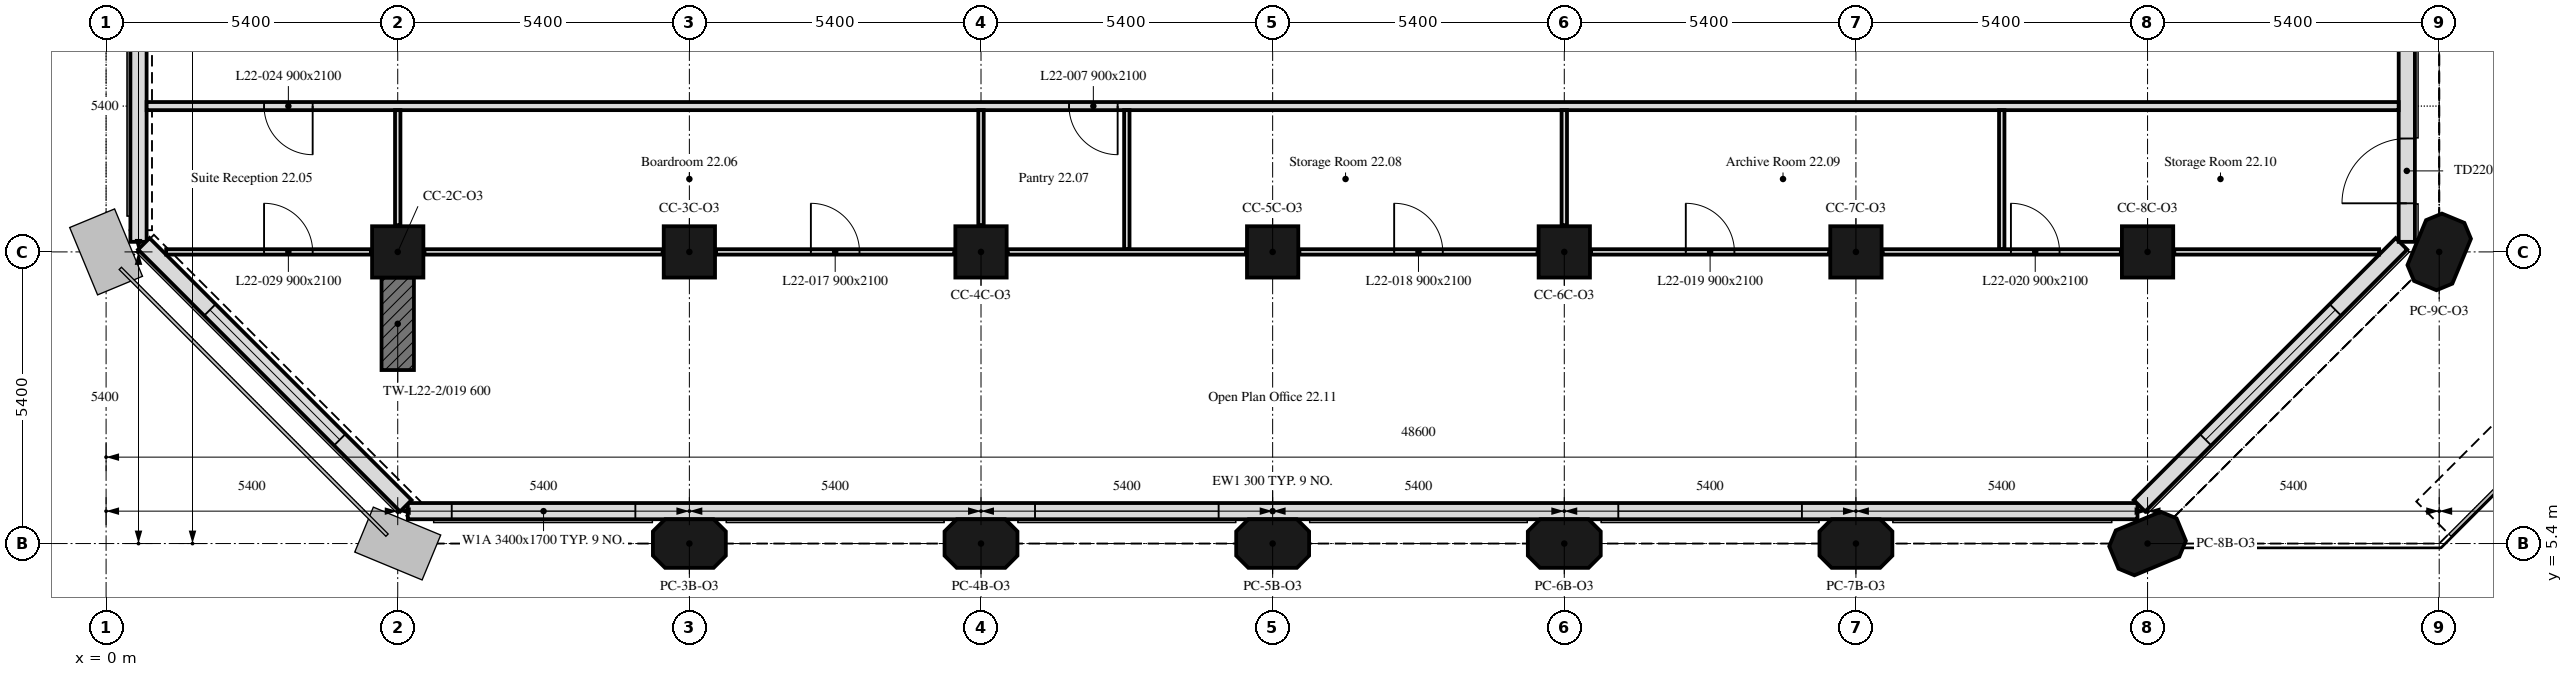
"""IFC4 building model, lengths in metres.
Left out: names, types, materials, properties, quantities, classifications, styles, units other than length and angle.
Written with IfcOpenShell. Run it as: python <this file> out.ifc"""

import sys

from ifc_helpers import new_model, si_unit, direction, frame, frame_2d, origin, origin_2d, place, context, subcontext, project, spatial, polyline, rectangle, outline, extrude, element, fill, save


model = new_model("IFC4")
c1 = context("Model", 3, precision=1e-05, world=origin(), true_north=direction((0.0, 1.0)))
c2 = subcontext(c1, "Body", "Model", "MODEL_VIEW")
j1 = project(units=[si_unit("LENGTHUNIT", "METRE"), si_unit("PLANEANGLEUNIT", "RADIAN")], contexts=[c1])
p1 = place(None, origin())
s1 = spatial("IfcSite", under=j1, at=p1, CompositionType="ELEMENT")
p2 = place(p1, origin())
s2 = spatial("IfcBuilding", under=s1, at=p2, CompositionType="ELEMENT")
p3 = place(p2, frame((0.0, 0.0, 95.4)))
s3 = spatial("IfcBuildingStorey", under=s2, at=p3, CompositionType="ELEMENT", Elevation=95.4)
for number, where, z_axis, x_axis in (
    (1, (10.8, 5.4, 0.0), (0.0, 0.0, 1.0), (1.0, 0.0, 0.0)),
    (2, (16.2, 5.4, 0.0), (0.0, 0.0, 1.0), (1.0, 0.0, 0.0)),
    (3, (21.6, 5.4, 0.0), (0.0, 0.0, 1.0), (1.0, 0.0, 0.0)),
    (4, (27.0, 5.4, 0.0), (0.0, 0.0, 1.0), (1.0, 0.0, 0.0)),
    (5, (32.4, 5.4, 0.0), (0.0, 0.0, 1.0), (1.0, 0.0, 0.0)),
    (6, (37.8, 5.4, 0.0), (0.0, 0.0, 1.0), (0.924, 0.383, 0.0)),
):
    element("IfcColumn", number, at=place(p3, frame(where, z_axis=z_axis, x_axis=x_axis)), inside=s3, PredefinedType="COLUMN", context=c2, shape_type="SweptSolid", body=[
        extrude(outline(polyline([(-0.45, -0.45), (0.45, -0.45), (0.675, -0.225), (0.675, 0.225), (0.45, 0.45), (-0.45, 0.45), (-0.675, 0.225), (-0.675, -0.225), (-0.45, -0.45)])), origin(), (0.0, 0.0, 1.0), 3.5),
    ])
for number, where, z_axis, x_axis in (
    (7, (5.4, 10.8, 0.0), (0.0, 0.0, 1.0), (1.0, 0.0, 0.0)),
    (8, (10.8, 10.8, 0.0), (0.0, 0.0, 1.0), (1.0, 0.0, 0.0)),
    (9, (16.2, 10.8, 0.0), (0.0, 0.0, 1.0), (1.0, 0.0, 0.0)),
    (10, (21.6, 10.8, 0.0), (0.0, 0.0, 1.0), (1.0, 0.0, 0.0)),
    (11, (27.0, 10.8, 0.0), (0.0, 0.0, 1.0), (1.0, 0.0, 0.0)),
    (12, (32.4, 10.8, 0.0), (0.0, 0.0, 1.0), (1.0, 0.0, 0.0)),
    (13, (37.8, 10.8, 0.0), (0.0, 0.0, 1.0), (1.0, 0.0, 0.0)),
):
    element("IfcColumn", number, at=place(p3, frame(where, z_axis=z_axis, x_axis=x_axis)), inside=s3, PredefinedType="COLUMN", context=c2, shape_type="SweptSolid", body=[
        extrude(rectangle(XDim=0.95, YDim=0.95, at=origin_2d()), origin(), (0.0, 0.0, 1.0), 3.5),
    ])
p4 = place(p3, frame((43.2, 10.8, 0.0), z_axis=(0.0, 0.0, 1.0), x_axis=(0.382683432365, 0.923879532511, 0.0)))
e14 = element("IfcColumn", 14, at=p4, inside=s3, PredefinedType="COLUMN", context=c2, shape_type="SweptSolid", body=[
    extrude(outline(polyline([(-0.45, -0.45), (0.45, -0.45), (0.675, -0.225), (0.675, 0.225), (0.45, 0.45), (-0.45, 0.45), (-0.675, 0.225), (-0.675, -0.225), (-0.45, -0.45)])), origin(), (0.0, 0.0, 1.0), 3.5),
])
p5 = place(p3, frame((5.4, 8.613, 0.0), z_axis=(0.0, 0.0, 1.0), x_axis=(0.0, 1.0, 0.0)))
e15 = element("IfcWall", 15, at=p5, inside=s3, PredefinedType="SHEAR", context=c2, shape_type="SweptSolid", body=[
    extrude(rectangle(XDim=1.712, YDim=0.6, at=frame_2d((0.856, 0.0))), origin(), (0.0, 0.0, 1.0), 3.5),
])
p6 = place(p3, frame((5.586, 6.0, 0.0), z_axis=(0.0, 0.0, 1.0), x_axis=(1.0, 0.0, 0.0)))
e16 = element("IfcWall", 16, at=p6, inside=s3, PredefinedType="SOLIDWALL", context=c2, shape_type="SweptSolid", body=[
    extrude(rectangle(XDim=32.027, YDim=0.3, at=frame_2d((16.014, 0.0))), origin(), (0.0, 0.0, 1.0), 3.5),
])
p7 = place(p6, frame((0.814, 0.0, 0.9)))
e17 = element("IfcOpeningElement", 17, at=p7, cuts=e16, PredefinedType="OPENING", context=c2, shape_type="SweptSolid", body=[
    extrude(rectangle(XDim=3.4, YDim=1.7, at=frame_2d((1.7, 0.85))), frame((0.0, 0.16, 0.0), z_axis=(0.0, -1.0, 0.0), x_axis=(1.0, 0.0, 0.0)), (0.0, 0.0, 1.0), 0.32),
])
p8 = place(p6, frame((11.614, 0.0, 0.9)))
e18 = element("IfcOpeningElement", 18, at=p8, cuts=e16, PredefinedType="OPENING", context=c2, shape_type="SweptSolid", body=[
    extrude(rectangle(XDim=3.4, YDim=1.7, at=frame_2d((1.7, 0.85))), frame((0.0, 0.16, 0.0), z_axis=(0.0, -1.0, 0.0), x_axis=(1.0, 0.0, 0.0)), (0.0, 0.0, 1.0), 0.32),
])
p9 = place(p6, frame((22.414, 0.0, 0.9)))
e19 = element("IfcOpeningElement", 19, at=p9, cuts=e16, PredefinedType="OPENING", context=c2, shape_type="SweptSolid", body=[
    extrude(rectangle(XDim=3.4, YDim=1.7, at=frame_2d((1.7, 0.85))), frame((0.0, 0.16, 0.0), z_axis=(0.0, -1.0, 0.0), x_axis=(1.0, 0.0, 0.0)), (0.0, 0.0, 1.0), 0.32),
])
p10 = place(p3, frame((37.65, 6.099, 0.0), z_axis=(0.0, 0.0, 1.0), x_axis=(0.707106781187, 0.707106781187, 0.0)))
e20 = element("IfcWall", 20, at=p10, inside=s3, PredefinedType="SOLIDWALL", context=c2, shape_type="SweptSolid", body=[
    extrude(rectangle(XDim=6.86, YDim=0.3, at=frame_2d((3.43, 0.0))), origin(), (0.0, 0.0, 1.0), 3.5),
])
p11 = place(p10, frame((1.73, 0.0, 0.9)))
e21 = element("IfcOpeningElement", 21, at=p11, cuts=e20, PredefinedType="OPENING", context=c2, shape_type="SweptSolid", body=[
    extrude(rectangle(XDim=3.4, YDim=1.7, at=frame_2d((1.7, 0.85))), frame((0.0, 0.16, 0.0), z_axis=(0.0, -1.0, 0.0), x_axis=(1.0, 0.0, 0.0)), (0.0, 0.0, 1.0), 0.32),
])
p12 = place(p3, frame((42.6, 10.986, 0.0), z_axis=(0.0, 0.0, 1.0), x_axis=(0.0, 1.0, 0.0)))
e22 = element("IfcWall", 22, at=p12, inside=s3, PredefinedType="SOLIDWALL", context=c2, shape_type="SweptSolid", body=[
    extrude(rectangle(XDim=5.214, YDim=0.3, at=frame_2d((2.607, 0.0))), origin(), (0.0, 0.0, 1.0), 3.5),
])
p13 = place(p12, frame((0.714, 0.0, 0.0)))
e23 = element("IfcOpeningElement", 23, at=p13, cuts=e22, PredefinedType="OPENING", context=c2, shape_type="SweptSolid", body=[
    extrude(rectangle(XDim=1.2, YDim=2.4, at=frame_2d((0.6, 1.2))), frame((0.0, 0.16, 0.0), z_axis=(0.0, -1.0, 0.0), x_axis=(1.0, 0.0, 0.0)), (0.0, 0.0, 1.0), 0.32),
])
p14 = place(p3, frame((0.6, 43.014, 0.0), z_axis=(0.0, 0.0, 1.0), x_axis=(0.0, -1.0, 0.0)))
e24 = element("IfcWall", 24, at=p14, inside=s3, PredefinedType="SOLIDWALL", context=c2, shape_type="SweptSolid", body=[
    extrude(rectangle(XDim=32.027, YDim=0.3, at=frame_2d((16.014, 0.0))), origin(), (0.0, 0.0, 1.0), 3.5),
])
p15 = place(p14, frame((0.814, 0.0, 0.9)))
e25 = element("IfcOpeningElement", 25, at=p15, cuts=e24, PredefinedType="OPENING", context=c2, shape_type="SweptSolid", body=[
    extrude(rectangle(XDim=3.4, YDim=1.7, at=frame_2d((1.7, 0.85))), frame((0.0, 0.16, 0.0), z_axis=(0.0, -1.0, 0.0), x_axis=(1.0, 0.0, 0.0)), (0.0, 0.0, 1.0), 0.32),
])
p16 = place(p3, frame((0.699, 10.949, 0.0), z_axis=(0.0, 0.0, 1.0), x_axis=(0.707106781187, -0.707106781187, 0.0)))
e26 = element("IfcWall", 26, at=p16, inside=s3, PredefinedType="SOLIDWALL", context=c2, shape_type="SweptSolid", body=[
    extrude(rectangle(XDim=6.86, YDim=0.3, at=frame_2d((3.43, 0.0))), origin(), (0.0, 0.0, 1.0), 3.5),
])
p17 = place(p16, frame((1.73, 0.0, 0.9)))
e27 = element("IfcOpeningElement", 27, at=p17, cuts=e26, PredefinedType="OPENING", context=c2, shape_type="SweptSolid", body=[
    extrude(rectangle(XDim=3.4, YDim=1.7, at=frame_2d((1.7, 0.85))), frame((0.0, 0.16, 0.0), z_axis=(0.0, -1.0, 0.0), x_axis=(1.0, 0.0, 0.0)), (0.0, 0.0, 1.0), 0.32),
])
p18 = place(p3, frame((42.449, 13.5, 0.0), z_axis=(0.0, 0.0, 1.0), x_axis=(-1.0, 0.0, 0.0)))
e28 = element("IfcWall", 28, at=p18, inside=s3, PredefinedType="PARTITIONING", context=c2, shape_type="SweptSolid", body=[
    extrude(rectangle(XDim=41.698, YDim=0.15, at=frame_2d((20.849, 0.0))), origin(), (0.0, 0.0, 1.0), 3.5),
])
p19 = place(p18, frame((23.719, 0.0, 0.0)))
e29 = element("IfcOpeningElement", 29, at=p19, cuts=e28, PredefinedType="OPENING", context=c2, shape_type="SweptSolid", body=[
    extrude(rectangle(XDim=0.9, YDim=2.1, at=frame_2d((0.45, 1.05))), frame((0.0, 0.075, 0.0), z_axis=(0.0, -1.0, 0.0), x_axis=(1.0, 0.0, 0.0)), (0.0, 0.0, 1.0), 0.15),
])
p20 = place(p18, frame((38.624, 0.0, 0.0)))
e30 = element("IfcOpeningElement", 30, at=p20, cuts=e28, PredefinedType="OPENING", context=c2, shape_type="SweptSolid", body=[
    extrude(rectangle(XDim=0.9, YDim=2.1, at=frame_2d((0.45, 1.05))), frame((0.0, 0.075, 0.0), z_axis=(0.0, -1.0, 0.0), x_axis=(1.0, 0.0, 0.0)), (0.0, 0.0, 1.0), 0.15),
])
p21 = place(p3, frame((1.112, 10.8, 0.0), z_axis=(0.0, 0.0, 1.0), x_axis=(1.0, 0.0, 0.0)))
e31 = element("IfcWall", 31, at=p21, inside=s3, PredefinedType="PARTITIONING", context=c2, shape_type="SweptSolid", body=[
    extrude(rectangle(XDim=3.793, YDim=0.1, at=frame_2d((1.896, 0.0))), origin(), (0.0, 0.0, 1.0), 3.5),
])
p22 = place(p21, frame((1.813, 0.0, 0.0)))
e32 = element("IfcOpeningElement", 32, at=p22, cuts=e31, PredefinedType="OPENING", context=c2, shape_type="SweptSolid", body=[
    extrude(rectangle(XDim=0.9, YDim=2.1, at=frame_2d((0.45, 1.05))), frame((0.0, 0.05, 0.0), z_axis=(0.0, -1.0, 0.0), x_axis=(1.0, 0.0, 0.0)), (0.0, 0.0, 1.0), 0.1),
])
p23 = place(p3, frame((5.4, 11.295, 0.0), z_axis=(0.0, 0.0, 1.0), x_axis=(0.0, 1.0, 0.0)))
e33 = element("IfcWall", 33, at=p23, inside=s3, PredefinedType="PARTITIONING", context=c2, shape_type="SweptSolid", body=[
    extrude(rectangle(XDim=2.13, YDim=0.1, at=frame_2d((1.065, 0.0))), origin(), (0.0, 0.0, 1.0), 3.5),
])
p24 = place(p3, frame((5.895, 10.8, 0.0), z_axis=(0.0, 0.0, 1.0), x_axis=(1.0, 0.0, 0.0)))
e34 = element("IfcWall", 34, at=p24, inside=s3, PredefinedType="PARTITIONING", context=c2, shape_type="SweptSolid", body=[
    extrude(rectangle(XDim=4.41, YDim=0.1, at=frame_2d((2.205, 0.0))), origin(), (0.0, 0.0, 1.0), 3.5),
])
p25 = place(p3, frame((11.295, 10.8, 0.0), z_axis=(0.0, 0.0, 1.0), x_axis=(1.0, 0.0, 0.0)))
e35 = element("IfcWall", 35, at=p25, inside=s3, PredefinedType="PARTITIONING", context=c2, shape_type="SweptSolid", body=[
    extrude(rectangle(XDim=4.41, YDim=0.1, at=frame_2d((2.205, 0.0))), origin(), (0.0, 0.0, 1.0), 3.5),
])
p26 = place(p25, frame((1.755, 0.0, 0.0)))
e36 = element("IfcOpeningElement", 36, at=p26, cuts=e35, PredefinedType="OPENING", context=c2, shape_type="SweptSolid", body=[
    extrude(rectangle(XDim=0.9, YDim=2.1, at=frame_2d((0.45, 1.05))), frame((0.0, 0.05, 0.0), z_axis=(0.0, -1.0, 0.0), x_axis=(1.0, 0.0, 0.0)), (0.0, 0.0, 1.0), 0.1),
])
p27 = place(p3, frame((16.2, 11.295, 0.0), z_axis=(0.0, 0.0, 1.0), x_axis=(0.0, 1.0, 0.0)))
e37 = element("IfcWall", 37, at=p27, inside=s3, PredefinedType="PARTITIONING", context=c2, shape_type="SweptSolid", body=[
    extrude(rectangle(XDim=2.13, YDim=0.1, at=frame_2d((1.065, 0.0))), origin(), (0.0, 0.0, 1.0), 3.5),
])
p28 = place(p3, frame((18.9, 10.85, 0.0), z_axis=(0.0, 0.0, 1.0), x_axis=(0.0, 1.0, 0.0)))
e38 = element("IfcWall", 38, at=p28, inside=s3, PredefinedType="PARTITIONING", context=c2, shape_type="SweptSolid", body=[
    extrude(rectangle(XDim=2.575, YDim=0.1, at=frame_2d((1.288, 0.0))), origin(), (0.0, 0.0, 1.0), 3.5),
])
p29 = place(p3, frame((16.695, 10.8, 0.0), z_axis=(0.0, 0.0, 1.0), x_axis=(1.0, 0.0, 0.0)))
e39 = element("IfcWall", 39, at=p29, inside=s3, PredefinedType="PARTITIONING", context=c2, shape_type="SweptSolid", body=[
    extrude(rectangle(XDim=4.41, YDim=0.1, at=frame_2d((2.205, 0.0))), origin(), (0.0, 0.0, 1.0), 3.5),
])
p30 = place(p3, frame((22.095, 10.8, 0.0), z_axis=(0.0, 0.0, 1.0), x_axis=(1.0, 0.0, 0.0)))
e40 = element("IfcWall", 40, at=p30, inside=s3, PredefinedType="PARTITIONING", context=c2, shape_type="SweptSolid", body=[
    extrude(rectangle(XDim=4.41, YDim=0.1, at=frame_2d((2.205, 0.0))), origin(), (0.0, 0.0, 1.0), 3.5),
])
p31 = place(p30, frame((1.755, 0.0, 0.0)))
e41 = element("IfcOpeningElement", 41, at=p31, cuts=e40, PredefinedType="OPENING", context=c2, shape_type="SweptSolid", body=[
    extrude(rectangle(XDim=0.9, YDim=2.1, at=frame_2d((0.45, 1.05))), frame((0.0, 0.05, 0.0), z_axis=(0.0, -1.0, 0.0), x_axis=(1.0, 0.0, 0.0)), (0.0, 0.0, 1.0), 0.1),
])
p32 = place(p3, frame((27.0, 11.295, 0.0), z_axis=(0.0, 0.0, 1.0), x_axis=(0.0, 1.0, 0.0)))
e42 = element("IfcWall", 42, at=p32, inside=s3, PredefinedType="PARTITIONING", context=c2, shape_type="SweptSolid", body=[
    extrude(rectangle(XDim=2.13, YDim=0.1, at=frame_2d((1.065, 0.0))), origin(), (0.0, 0.0, 1.0), 3.5),
])
p33 = place(p3, frame((27.495, 10.8, 0.0), z_axis=(0.0, 0.0, 1.0), x_axis=(1.0, 0.0, 0.0)))
e43 = element("IfcWall", 43, at=p33, inside=s3, PredefinedType="PARTITIONING", context=c2, shape_type="SweptSolid", body=[
    extrude(rectangle(XDim=4.41, YDim=0.1, at=frame_2d((2.205, 0.0))), origin(), (0.0, 0.0, 1.0), 3.5),
])
p34 = place(p33, frame((1.755, 0.0, 0.0)))
e44 = element("IfcOpeningElement", 44, at=p34, cuts=e43, PredefinedType="OPENING", context=c2, shape_type="SweptSolid", body=[
    extrude(rectangle(XDim=0.9, YDim=2.1, at=frame_2d((0.45, 1.05))), frame((0.0, 0.05, 0.0), z_axis=(0.0, -1.0, 0.0), x_axis=(1.0, 0.0, 0.0)), (0.0, 0.0, 1.0), 0.1),
])
p35 = place(p3, frame((35.1, 10.85, 0.0), z_axis=(0.0, 0.0, 1.0), x_axis=(0.0, 1.0, 0.0)))
e45 = element("IfcWall", 45, at=p35, inside=s3, PredefinedType="PARTITIONING", context=c2, shape_type="SweptSolid", body=[
    extrude(rectangle(XDim=2.575, YDim=0.1, at=frame_2d((1.288, 0.0))), origin(), (0.0, 0.0, 1.0), 3.5),
])
p36 = place(p3, frame((32.895, 10.8, 0.0), z_axis=(0.0, 0.0, 1.0), x_axis=(1.0, 0.0, 0.0)))
e46 = element("IfcWall", 46, at=p36, inside=s3, PredefinedType="PARTITIONING", context=c2, shape_type="SweptSolid", body=[
    extrude(rectangle(XDim=4.41, YDim=0.1, at=frame_2d((2.205, 0.0))), origin(), (0.0, 0.0, 1.0), 3.5),
])
p37 = place(p36, frame((2.375, 0.0, 0.0)))
e47 = element("IfcOpeningElement", 47, at=p37, cuts=e46, PredefinedType="OPENING", context=c2, shape_type="SweptSolid", body=[
    extrude(rectangle(XDim=0.9, YDim=2.1, at=frame_2d((0.45, 1.05))), frame((0.0, 0.05, 0.0), z_axis=(0.0, -1.0, 0.0), x_axis=(1.0, 0.0, 0.0)), (0.0, 0.0, 1.0), 0.1),
])
p38 = place(p3, frame((38.295, 10.8, 0.0), z_axis=(0.0, 0.0, 1.0), x_axis=(1.0, 0.0, 0.0)))
e48 = element("IfcWall", 48, at=p38, inside=s3, PredefinedType="PARTITIONING", context=c2, shape_type="SweptSolid", body=[
    extrude(rectangle(XDim=3.793, YDim=0.1, at=frame_2d((1.896, 0.0))), origin(), (0.0, 0.0, 1.0), 3.5),
])
p39 = place(p13, origin())
e49 = element("IfcDoor", 49, at=p39, inside=s3, OperationType="SINGLE_SWING_LEFT", PredefinedType="DOOR", context=c2, shape_type="SweptSolid", body=[
    extrude(rectangle(XDim=1.2, YDim=2.4, at=frame_2d((0.6, 1.2))), frame((0.0, 0.025, 0.0), z_axis=(0.0, -1.0, 0.0), x_axis=(1.0, 0.0, 0.0)), (0.0, 0.0, 1.0), 0.05),
])
fill(e23, e49)
p40 = place(p7, origin())
e50 = element("IfcWindow", 50, at=p40, inside=s3, PartitioningType="SINGLE_PANEL", PredefinedType="WINDOW", context=c2, shape_type="SweptSolid", body=[
    extrude(rectangle(XDim=3.4, YDim=1.7, at=frame_2d((1.7, 0.85))), frame((0.0, 0.03, 0.0), z_axis=(0.0, -1.0, 0.0), x_axis=(1.0, 0.0, 0.0)), (0.0, 0.0, 1.0), 0.06),
])
fill(e17, e50)
p41 = place(p8, origin())
e51 = element("IfcWindow", 51, at=p41, inside=s3, PartitioningType="SINGLE_PANEL", PredefinedType="WINDOW", context=c2, shape_type="SweptSolid", body=[
    extrude(rectangle(XDim=3.4, YDim=1.7, at=frame_2d((1.7, 0.85))), frame((0.0, 0.03, 0.0), z_axis=(0.0, -1.0, 0.0), x_axis=(1.0, 0.0, 0.0)), (0.0, 0.0, 1.0), 0.06),
])
fill(e18, e51)
p42 = place(p9, origin())
e52 = element("IfcWindow", 52, at=p42, inside=s3, PartitioningType="SINGLE_PANEL", PredefinedType="WINDOW", context=c2, shape_type="SweptSolid", body=[
    extrude(rectangle(XDim=3.4, YDim=1.7, at=frame_2d((1.7, 0.85))), frame((0.0, 0.03, 0.0), z_axis=(0.0, -1.0, 0.0), x_axis=(1.0, 0.0, 0.0)), (0.0, 0.0, 1.0), 0.06),
])
fill(e19, e52)
p43 = place(p11, origin())
e53 = element("IfcWindow", 53, at=p43, inside=s3, PartitioningType="SINGLE_PANEL", PredefinedType="WINDOW", context=c2, shape_type="SweptSolid", body=[
    extrude(rectangle(XDim=3.4, YDim=1.7, at=frame_2d((1.7, 0.85))), frame((0.0, 0.03, 0.0), z_axis=(0.0, -1.0, 0.0), x_axis=(1.0, 0.0, 0.0)), (0.0, 0.0, 1.0), 0.06),
])
fill(e21, e53)
p44 = place(p17, origin())
e54 = element("IfcWindow", 54, at=p44, inside=s3, PartitioningType="SINGLE_PANEL", PredefinedType="WINDOW", context=c2, shape_type="SweptSolid", body=[
    extrude(rectangle(XDim=3.4, YDim=1.7, at=frame_2d((1.7, 0.85))), frame((0.0, 0.03, 0.0), z_axis=(0.0, -1.0, 0.0), x_axis=(1.0, 0.0, 0.0)), (0.0, 0.0, 1.0), 0.06),
])
fill(e27, e54)
p45 = place(p19, origin())
e55 = element("IfcDoor", 55, at=p45, inside=s3, OperationType="SINGLE_SWING_LEFT", PredefinedType="DOOR", context=c2, shape_type="SweptSolid", body=[
    extrude(rectangle(XDim=0.9, YDim=2.1, at=frame_2d((0.45, 1.05))), frame((0.0, 0.025, 0.0), z_axis=(0.0, -1.0, 0.0), x_axis=(1.0, 0.0, 0.0)), (0.0, 0.0, 1.0), 0.05),
])
fill(e29, e55)
p46 = place(p26, origin())
e56 = element("IfcDoor", 56, at=p46, inside=s3, OperationType="SINGLE_SWING_LEFT", PredefinedType="DOOR", context=c2, shape_type="SweptSolid", body=[
    extrude(rectangle(XDim=0.9, YDim=2.1, at=frame_2d((0.45, 1.05))), frame((0.0, 0.025, 0.0), z_axis=(0.0, -1.0, 0.0), x_axis=(1.0, 0.0, 0.0)), (0.0, 0.0, 1.0), 0.05),
])
fill(e36, e56)
p47 = place(p31, origin())
e57 = element("IfcDoor", 57, at=p47, inside=s3, OperationType="SINGLE_SWING_RIGHT", PredefinedType="DOOR", context=c2, shape_type="SweptSolid", body=[
    extrude(rectangle(XDim=0.9, YDim=2.1, at=frame_2d((0.45, 1.05))), frame((0.0, 0.025, 0.0), z_axis=(0.0, -1.0, 0.0), x_axis=(1.0, 0.0, 0.0)), (0.0, 0.0, 1.0), 0.05),
])
fill(e41, e57)
p48 = place(p34, origin())
e58 = element("IfcDoor", 58, at=p48, inside=s3, OperationType="SINGLE_SWING_LEFT", PredefinedType="DOOR", context=c2, shape_type="SweptSolid", body=[
    extrude(rectangle(XDim=0.9, YDim=2.1, at=frame_2d((0.45, 1.05))), frame((0.0, 0.025, 0.0), z_axis=(0.0, -1.0, 0.0), x_axis=(1.0, 0.0, 0.0)), (0.0, 0.0, 1.0), 0.05),
])
fill(e44, e58)
p49 = place(p37, origin())
e59 = element("IfcDoor", 59, at=p49, inside=s3, OperationType="SINGLE_SWING_RIGHT", PredefinedType="DOOR", context=c2, shape_type="SweptSolid", body=[
    extrude(rectangle(XDim=0.9, YDim=2.1, at=frame_2d((0.45, 1.05))), frame((0.0, 0.025, 0.0), z_axis=(0.0, -1.0, 0.0), x_axis=(1.0, 0.0, 0.0)), (0.0, 0.0, 1.0), 0.05),
])
fill(e47, e59)
p50 = place(p20, origin())
e60 = element("IfcDoor", 60, at=p50, inside=s3, OperationType="SINGLE_SWING_LEFT", PredefinedType="DOOR", context=c2, shape_type="SweptSolid", body=[
    extrude(rectangle(XDim=0.9, YDim=2.1, at=frame_2d((0.45, 1.05))), frame((0.0, 0.025, 0.0), z_axis=(0.0, -1.0, 0.0), x_axis=(1.0, 0.0, 0.0)), (0.0, 0.0, 1.0), 0.05),
])
fill(e30, e60)
p51 = place(p22, origin())
e61 = element("IfcDoor", 61, at=p51, inside=s3, OperationType="SINGLE_SWING_RIGHT", PredefinedType="DOOR", context=c2, shape_type="SweptSolid", body=[
    extrude(rectangle(XDim=0.9, YDim=2.1, at=frame_2d((0.45, 1.05))), frame((0.0, 0.025, 0.0), z_axis=(0.0, -1.0, 0.0), x_axis=(1.0, 0.0, 0.0)), (0.0, 0.0, 1.0), 0.05),
])
fill(e32, e61)
save(model, sys.argv[1])
